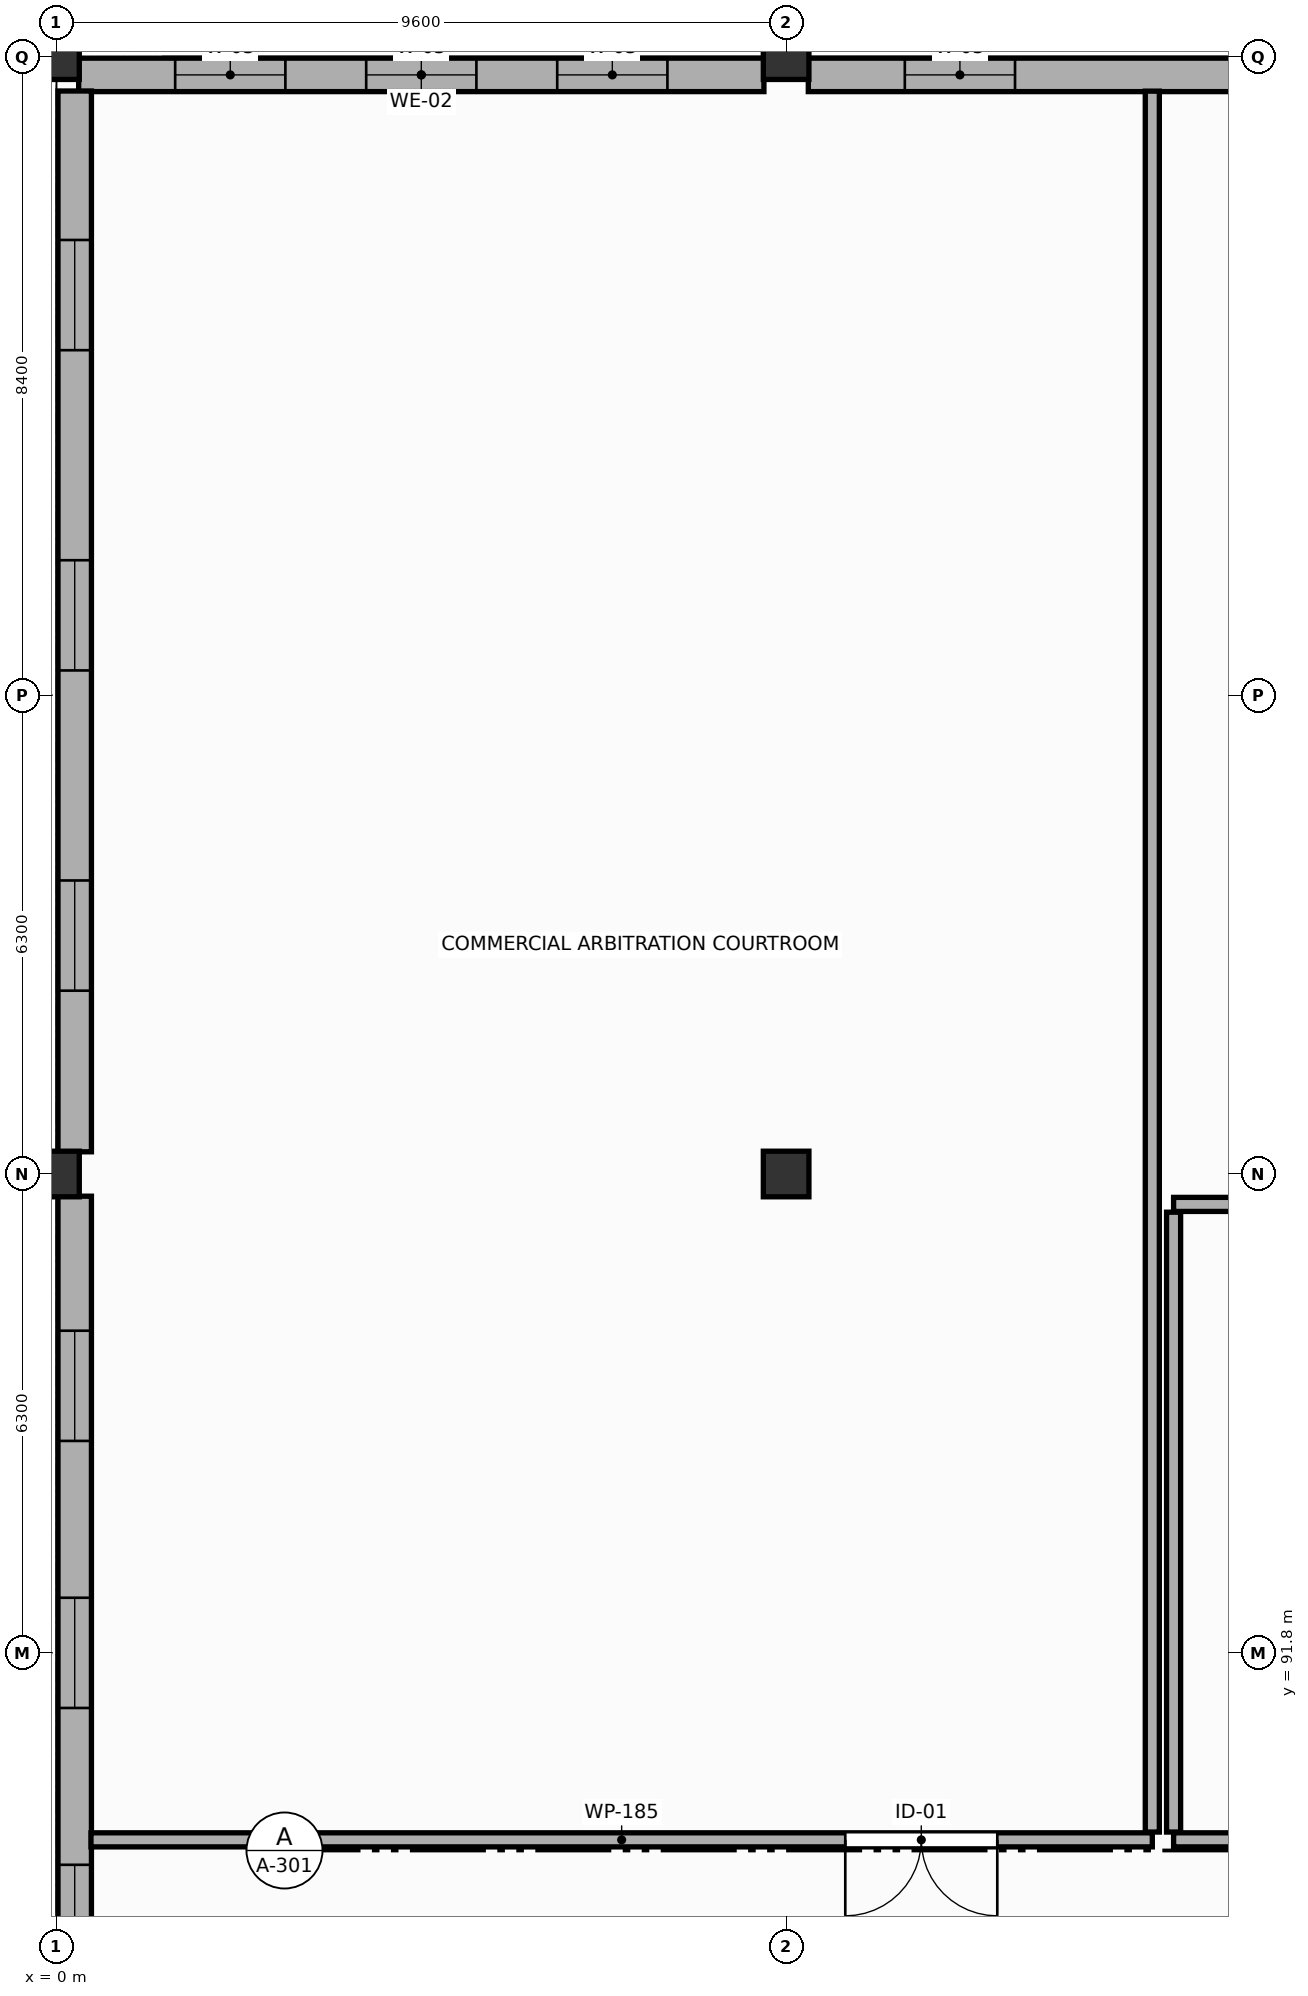
"""IFC4 building model, lengths in metres.
Left out: names, types, materials, properties, quantities, classifications, styles, units other than length and angle.
Written with IfcOpenShell. Run it as: python <this file> out.ifc"""

import sys

from ifc_helpers import new_model, si_unit, direction, frame, frame_2d, origin, origin_2d, place, context, subcontext, project, spatial, rectangle, extrude, element, fill, save


model = new_model("IFC4")
c1 = context("Model", 3, precision=1e-05, world=origin(), true_north=direction((0.0, 1.0)))
c2 = subcontext(c1, "Body", "Model", "MODEL_VIEW")
j1 = project(units=[si_unit("LENGTHUNIT", "METRE"), si_unit("PLANEANGLEUNIT", "RADIAN")], contexts=[c1])
p1 = place(None, origin())
s1 = spatial("IfcSite", under=j1, at=p1, CompositionType="ELEMENT")
p2 = place(p1, origin())
s2 = spatial("IfcBuilding", under=s1, at=p2, CompositionType="ELEMENT")
p3 = place(p2, frame((0.0, 0.0, 22.8)))
s3 = spatial("IfcBuildingStorey", under=s2, at=p3, CompositionType="ELEMENT", Elevation=22.8)
for number, where, z_axis, x_axis in (
    (1, (0.0, 98.1, 0.0), (0.0, 0.0, 1.0), (1.0, 0.0, 0.0)),
    (2, (0.0, 112.8, 0.0), (0.0, 0.0, 1.0), (1.0, 0.0, 0.0)),
    (3, (9.6, 98.1, 0.0), (0.0, 0.0, 1.0), (1.0, 0.0, 0.0)),
    (4, (9.6, 112.8, 0.0), (0.0, 0.0, 1.0), (1.0, 0.0, 0.0)),
):
    element("IfcColumn", number, at=place(p3, frame(where, z_axis=z_axis, x_axis=x_axis)), inside=s3, PredefinedType="COLUMN", context=c2, shape_type="SweptSolid", body=[
        extrude(rectangle(XDim=0.6, YDim=0.6, at=origin_2d()), origin(), (0.0, 0.0, 1.0), 4.2),
    ])
p4 = place(p3, frame((0.292, 112.56, 0.0), z_axis=(0.0, 0.0, 1.0), x_axis=(1.0, 0.0, 0.0)))
e5 = element("IfcWall", 5, at=p4, inside=s3, PredefinedType="STANDARD", context=c2, shape_type="SweptSolid", body=[
    extrude(rectangle(XDim=9.016, YDim=0.44, at=frame_2d((4.508, 0.0))), origin(), (0.0, 0.0, 1.0), 3.05),
])
p5 = place(p4, frame((1.27, 0.0, 0.78)))
e6 = element("IfcOpeningElement", 6, at=p5, cuts=e5, PredefinedType="OPENING", context=c2, shape_type="SweptSolid", body=[
    extrude(rectangle(XDim=1.45, YDim=2.05, at=frame_2d((0.725, 1.025))), frame((0.0, 0.23, 0.0), z_axis=(0.0, -1.0, 0.0), x_axis=(1.0, 0.0, 0.0)), (0.0, 0.0, 1.0), 0.46),
])
p6 = place(p4, frame((3.783, 0.0, 0.78)))
e7 = element("IfcOpeningElement", 7, at=p6, cuts=e5, PredefinedType="OPENING", context=c2, shape_type="SweptSolid", body=[
    extrude(rectangle(XDim=1.45, YDim=2.05, at=frame_2d((0.725, 1.025))), frame((0.0, 0.23, 0.0), z_axis=(0.0, -1.0, 0.0), x_axis=(1.0, 0.0, 0.0)), (0.0, 0.0, 1.0), 0.46),
])
p7 = place(p4, frame((6.296, 0.0, 0.78)))
e8 = element("IfcOpeningElement", 8, at=p7, cuts=e5, PredefinedType="OPENING", context=c2, shape_type="SweptSolid", body=[
    extrude(rectangle(XDim=1.45, YDim=2.05, at=frame_2d((0.725, 1.025))), frame((0.0, 0.23, 0.0), z_axis=(0.0, -1.0, 0.0), x_axis=(1.0, 0.0, 0.0)), (0.0, 0.0, 1.0), 0.46),
])
p8 = place(p3, frame((9.892, 112.56, 0.0), z_axis=(0.0, 0.0, 1.0), x_axis=(1.0, 0.0, 0.0)))
e9 = element("IfcWall", 9, at=p8, inside=s3, PredefinedType="STANDARD", context=c2, shape_type="SweptSolid", body=[
    extrude(rectangle(XDim=9.016, YDim=0.44, at=frame_2d((4.508, 0.0))), origin(), (0.0, 0.0, 1.0), 3.05),
])
p9 = place(p8, frame((1.27, 0.0, 0.78)))
e10 = element("IfcOpeningElement", 10, at=p9, cuts=e9, PredefinedType="OPENING", context=c2, shape_type="SweptSolid", body=[
    extrude(rectangle(XDim=1.45, YDim=2.05, at=frame_2d((0.725, 1.025))), frame((0.0, 0.23, 0.0), z_axis=(0.0, -1.0, 0.0), x_axis=(1.0, 0.0, 0.0)), (0.0, 0.0, 1.0), 0.46),
])
p10 = place(p8, frame((6.296, 0.0, 0.78)))
e11 = element("IfcOpeningElement", 11, at=p10, cuts=e9, PredefinedType="OPENING", context=c2, shape_type="SweptSolid", body=[
    extrude(rectangle(XDim=1.45, YDim=2.05, at=frame_2d((0.725, 1.025))), frame((0.0, 0.23, 0.0), z_axis=(0.0, -1.0, 0.0), x_axis=(1.0, 0.0, 0.0)), (0.0, 0.0, 1.0), 0.46),
])
p11 = place(p3, frame((0.24, 85.792, 0.0), z_axis=(0.0, 0.0, 1.0), x_axis=(0.0, 1.0, 0.0)))
e12 = element("IfcWall", 12, at=p11, inside=s3, PredefinedType="STANDARD", context=c2, shape_type="SweptSolid", body=[
    extrude(rectangle(XDim=12.016, YDim=0.44, at=frame_2d((6.008, 0.0))), origin(), (0.0, 0.0, 1.0), 3.05),
])
p12 = place(p11, frame((1.77, 0.0, 0.78)))
e13 = element("IfcOpeningElement", 13, at=p12, cuts=e12, PredefinedType="OPENING", context=c2, shape_type="SweptSolid", body=[
    extrude(rectangle(XDim=1.45, YDim=2.05, at=frame_2d((0.725, 1.025))), frame((0.0, 0.23, 0.0), z_axis=(0.0, -1.0, 0.0), x_axis=(1.0, 0.0, 0.0)), (0.0, 0.0, 1.0), 0.46),
])
p13 = place(p11, frame((5.283, 0.0, 0.78)))
e14 = element("IfcOpeningElement", 14, at=p13, cuts=e12, PredefinedType="OPENING", context=c2, shape_type="SweptSolid", body=[
    extrude(rectangle(XDim=1.45, YDim=2.05, at=frame_2d((0.725, 1.025))), frame((0.0, 0.23, 0.0), z_axis=(0.0, -1.0, 0.0), x_axis=(1.0, 0.0, 0.0)), (0.0, 0.0, 1.0), 0.46),
])
p14 = place(p11, frame((8.796, 0.0, 0.78)))
e15 = element("IfcOpeningElement", 15, at=p14, cuts=e12, PredefinedType="OPENING", context=c2, shape_type="SweptSolid", body=[
    extrude(rectangle(XDim=1.45, YDim=2.05, at=frame_2d((0.725, 1.025))), frame((0.0, 0.23, 0.0), z_axis=(0.0, -1.0, 0.0), x_axis=(1.0, 0.0, 0.0)), (0.0, 0.0, 1.0), 0.46),
])
p15 = place(p3, frame((0.24, 98.392, 0.0), z_axis=(0.0, 0.0, 1.0), x_axis=(0.0, 1.0, 0.0)))
e16 = element("IfcWall", 16, at=p15, inside=s3, PredefinedType="STANDARD", context=c2, shape_type="SweptSolid", body=[
    extrude(rectangle(XDim=13.956, YDim=0.44, at=frame_2d((6.978, 0.0))), origin(), (0.0, 0.0, 1.0), 3.05),
])
p16 = place(p15, frame((2.12, 0.0, 0.78)))
e17 = element("IfcOpeningElement", 17, at=p16, cuts=e16, PredefinedType="OPENING", context=c2, shape_type="SweptSolid", body=[
    extrude(rectangle(XDim=1.45, YDim=2.05, at=frame_2d((0.725, 1.025))), frame((0.0, 0.23, 0.0), z_axis=(0.0, -1.0, 0.0), x_axis=(1.0, 0.0, 0.0)), (0.0, 0.0, 1.0), 0.46),
])
p17 = place(p15, frame((6.333, 0.0, 0.78)))
e18 = element("IfcOpeningElement", 18, at=p17, cuts=e16, PredefinedType="OPENING", context=c2, shape_type="SweptSolid", body=[
    extrude(rectangle(XDim=1.45, YDim=2.05, at=frame_2d((0.725, 1.025))), frame((0.0, 0.23, 0.0), z_axis=(0.0, -1.0, 0.0), x_axis=(1.0, 0.0, 0.0)), (0.0, 0.0, 1.0), 0.46),
])
p18 = place(p15, frame((10.546, 0.0, 0.78)))
e19 = element("IfcOpeningElement", 19, at=p18, cuts=e16, PredefinedType="OPENING", context=c2, shape_type="SweptSolid", body=[
    extrude(rectangle(XDim=1.45, YDim=2.05, at=frame_2d((0.725, 1.025))), frame((0.0, 0.23, 0.0), z_axis=(0.0, -1.0, 0.0), x_axis=(1.0, 0.0, 0.0)), (0.0, 0.0, 1.0), 0.46),
])
p19 = place(p3, frame((14.418, 89.34, 0.0), z_axis=(0.0, 0.0, 1.0), x_axis=(-1.0, 0.0, 0.0)))
e20 = element("IfcWall", 20, at=p19, inside=s3, PredefinedType="PARTITIONING", context=c2, shape_type="SweptSolid", body=[
    extrude(rectangle(XDim=13.964, YDim=0.185, at=frame_2d((6.982, 0.0))), origin(), (0.0, 0.0, 1.0), 3.1),
])
p20 = place(p19, frame((2.04, 0.0, 0.0)))
e21 = element("IfcOpeningElement", 21, at=p20, cuts=e20, PredefinedType="OPENING", context=c2, shape_type="SweptSolid", body=[
    extrude(rectangle(XDim=2.0, YDim=2.5, at=frame_2d((1.0, 1.25))), frame((0.0, 0.103, 0.0), z_axis=(0.0, -1.0, 0.0), x_axis=(1.0, 0.0, 0.0)), (0.0, 0.0, 1.0), 0.205),
])
p21 = place(p3, frame((14.418, 112.346, 0.0), z_axis=(0.0, 0.0, 1.0), x_axis=(0.0, -1.0, 0.0)))
e22 = element("IfcWall", 22, at=p21, inside=s3, PredefinedType="PARTITIONING", context=c2, shape_type="SweptSolid", body=[
    extrude(rectangle(XDim=22.904, YDim=0.185, at=frame_2d((11.452, 0.0))), origin(), (0.0, 0.0, 1.0), 3.3),
])
p22 = place(p3, frame((14.698, 97.7, 0.0), z_axis=(0.0, 0.0, 1.0), x_axis=(1.0, 0.0, 0.0)))
e23 = element("IfcWall", 23, at=p22, inside=s3, PredefinedType="PARTITIONING", context=c2, shape_type="SweptSolid", body=[
    extrude(rectangle(XDim=11.362, YDim=0.185, at=frame_2d((5.681, 0.0))), origin(), (0.0, 0.0, 1.0), 3.05),
])
p23 = place(p3, frame((26.06, 89.34, 0.0), z_axis=(0.0, 0.0, 1.0), x_axis=(-1.0, 0.0, 0.0)))
e24 = element("IfcWall", 24, at=p23, inside=s3, PredefinedType="PARTITIONING", context=c2, shape_type="SweptSolid", body=[
    extrude(rectangle(XDim=11.362, YDim=0.185, at=frame_2d((5.681, 0.0))), origin(), (0.0, 0.0, 1.0), 3.1),
])
p24 = place(p23, frame((2.083, 0.0, 0.0)))
e25 = element("IfcOpeningElement", 25, at=p24, cuts=e24, PredefinedType="OPENING", context=c2, shape_type="SweptSolid", body=[
    extrude(rectangle(XDim=2.0, YDim=2.5, at=frame_2d((1.0, 1.25))), frame((0.0, 0.103, 0.0), z_axis=(0.0, -1.0, 0.0), x_axis=(1.0, 0.0, 0.0)), (0.0, 0.0, 1.0), 0.205),
])
p25 = place(p3, frame((14.698, 89.442, 0.0), z_axis=(0.0, 0.0, 1.0), x_axis=(0.0, 1.0, 0.0)))
e26 = element("IfcWall", 26, at=p25, inside=s3, PredefinedType="PARTITIONING", context=c2, shape_type="SweptSolid", body=[
    extrude(rectangle(XDim=8.155, YDim=0.185, at=frame_2d((4.078, 0.0))), origin(), (0.0, 0.0, 1.0), 3.35),
])
p26 = place(p5, origin())
e27 = element("IfcWindow", 27, at=p26, inside=s3, PartitioningType="SINGLE_PANEL", PredefinedType="WINDOW", context=c2, shape_type="SweptSolid", body=[
    extrude(rectangle(XDim=1.45, YDim=2.05, at=frame_2d((0.725, 1.025))), frame((0.0, 0.03, 0.0), z_axis=(0.0, -1.0, 0.0), x_axis=(1.0, 0.0, 0.0)), (0.0, 0.0, 1.0), 0.06),
])
fill(e6, e27)
p27 = place(p6, origin())
e28 = element("IfcWindow", 28, at=p27, inside=s3, PartitioningType="SINGLE_PANEL", PredefinedType="WINDOW", context=c2, shape_type="SweptSolid", body=[
    extrude(rectangle(XDim=1.45, YDim=2.05, at=frame_2d((0.725, 1.025))), frame((0.0, 0.03, 0.0), z_axis=(0.0, -1.0, 0.0), x_axis=(1.0, 0.0, 0.0)), (0.0, 0.0, 1.0), 0.06),
])
fill(e7, e28)
p28 = place(p7, origin())
e29 = element("IfcWindow", 29, at=p28, inside=s3, PartitioningType="SINGLE_PANEL", PredefinedType="WINDOW", context=c2, shape_type="SweptSolid", body=[
    extrude(rectangle(XDim=1.45, YDim=2.05, at=frame_2d((0.725, 1.025))), frame((0.0, 0.03, 0.0), z_axis=(0.0, -1.0, 0.0), x_axis=(1.0, 0.0, 0.0)), (0.0, 0.0, 1.0), 0.06),
])
fill(e8, e29)
p29 = place(p9, origin())
e30 = element("IfcWindow", 30, at=p29, inside=s3, PartitioningType="SINGLE_PANEL", PredefinedType="WINDOW", context=c2, shape_type="SweptSolid", body=[
    extrude(rectangle(XDim=1.45, YDim=2.05, at=frame_2d((0.725, 1.025))), frame((0.0, 0.03, 0.0), z_axis=(0.0, -1.0, 0.0), x_axis=(1.0, 0.0, 0.0)), (0.0, 0.0, 1.0), 0.06),
])
fill(e10, e30)
p30 = place(p12, origin())
e31 = element("IfcWindow", 31, at=p30, inside=s3, PartitioningType="SINGLE_PANEL", PredefinedType="WINDOW", context=c2, shape_type="SweptSolid", body=[
    extrude(rectangle(XDim=1.45, YDim=2.05, at=frame_2d((0.725, 1.025))), frame((0.0, 0.03, 0.0), z_axis=(0.0, -1.0, 0.0), x_axis=(1.0, 0.0, 0.0)), (0.0, 0.0, 1.0), 0.06),
])
fill(e13, e31)
p31 = place(p13, origin())
e32 = element("IfcWindow", 32, at=p31, inside=s3, PartitioningType="SINGLE_PANEL", PredefinedType="WINDOW", context=c2, shape_type="SweptSolid", body=[
    extrude(rectangle(XDim=1.45, YDim=2.05, at=frame_2d((0.725, 1.025))), frame((0.0, 0.03, 0.0), z_axis=(0.0, -1.0, 0.0), x_axis=(1.0, 0.0, 0.0)), (0.0, 0.0, 1.0), 0.06),
])
fill(e14, e32)
p32 = place(p14, origin())
e33 = element("IfcWindow", 33, at=p32, inside=s3, PartitioningType="SINGLE_PANEL", PredefinedType="WINDOW", context=c2, shape_type="SweptSolid", body=[
    extrude(rectangle(XDim=1.45, YDim=2.05, at=frame_2d((0.725, 1.025))), frame((0.0, 0.03, 0.0), z_axis=(0.0, -1.0, 0.0), x_axis=(1.0, 0.0, 0.0)), (0.0, 0.0, 1.0), 0.06),
])
fill(e15, e33)
p33 = place(p16, origin())
e34 = element("IfcWindow", 34, at=p33, inside=s3, PartitioningType="SINGLE_PANEL", PredefinedType="WINDOW", context=c2, shape_type="SweptSolid", body=[
    extrude(rectangle(XDim=1.45, YDim=2.05, at=frame_2d((0.725, 1.025))), frame((0.0, 0.03, 0.0), z_axis=(0.0, -1.0, 0.0), x_axis=(1.0, 0.0, 0.0)), (0.0, 0.0, 1.0), 0.06),
])
fill(e17, e34)
p34 = place(p17, origin())
e35 = element("IfcWindow", 35, at=p34, inside=s3, PartitioningType="SINGLE_PANEL", PredefinedType="WINDOW", context=c2, shape_type="SweptSolid", body=[
    extrude(rectangle(XDim=1.45, YDim=2.05, at=frame_2d((0.725, 1.025))), frame((0.0, 0.03, 0.0), z_axis=(0.0, -1.0, 0.0), x_axis=(1.0, 0.0, 0.0)), (0.0, 0.0, 1.0), 0.06),
])
fill(e18, e35)
p35 = place(p18, origin())
e36 = element("IfcWindow", 36, at=p35, inside=s3, PartitioningType="SINGLE_PANEL", PredefinedType="WINDOW", context=c2, shape_type="SweptSolid", body=[
    extrude(rectangle(XDim=1.45, YDim=2.05, at=frame_2d((0.725, 1.025))), frame((0.0, 0.03, 0.0), z_axis=(0.0, -1.0, 0.0), x_axis=(1.0, 0.0, 0.0)), (0.0, 0.0, 1.0), 0.06),
])
fill(e19, e36)
p36 = place(p20, origin())
e37 = element("IfcDoor", 37, at=p36, inside=s3, OperationType="DOUBLE_DOOR_SINGLE_SWING", PredefinedType="DOOR", context=c2, shape_type="SweptSolid", body=[
    extrude(rectangle(XDim=2.0, YDim=2.5, at=frame_2d((1.0, 1.25))), frame((0.0, 0.025, 0.0), z_axis=(0.0, -1.0, 0.0), x_axis=(1.0, 0.0, 0.0)), (0.0, 0.0, 1.0), 0.05),
])
fill(e21, e37)
save(model, sys.argv[1])
